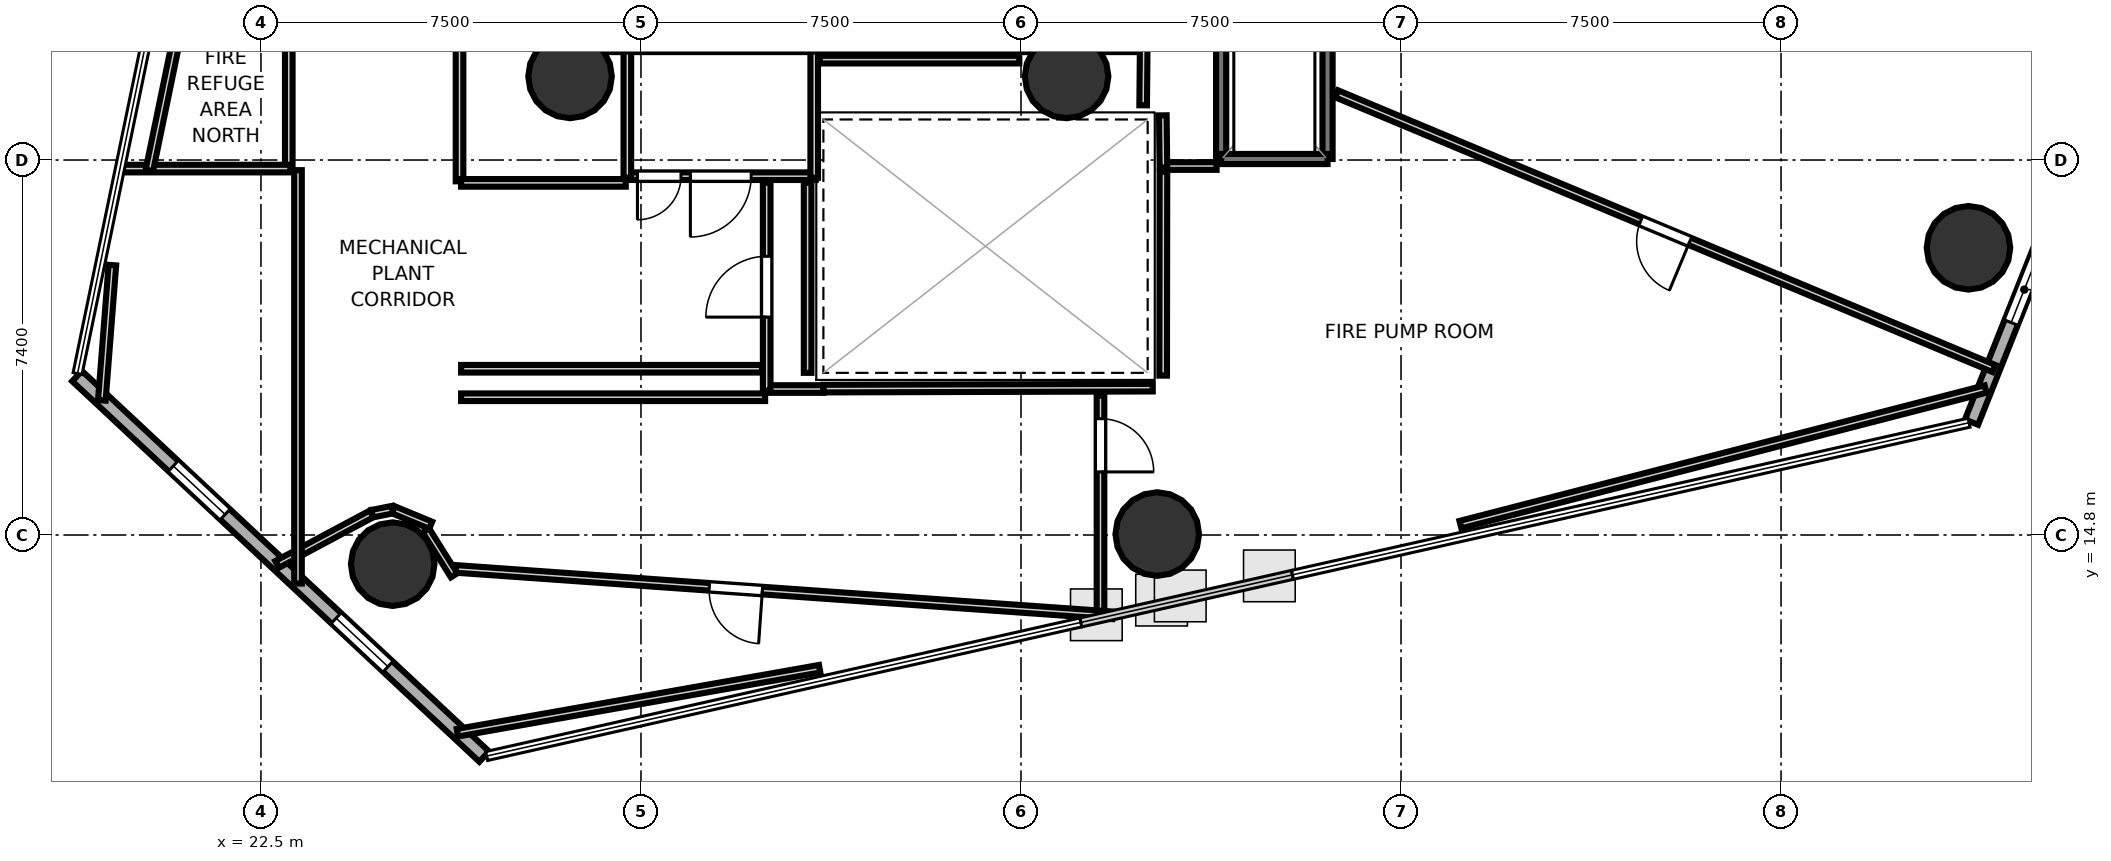
"""IFC4 building model, lengths in metres.
Left out: names, types, materials, properties, quantities, classifications, styles, units other than length and angle.
Written with IfcOpenShell. Run it as: python <this file> out.ifc"""

import sys

from ifc_helpers import new_model, si_unit, direction, frame, frame_2d, origin, origin_2d, place, context, subcontext, project, spatial, rectangle, hollow_circle, extrude, element, fill, save


model = new_model("IFC4")
c1 = context("Model", 3, precision=1e-05, world=origin(), true_north=direction((0.0, 1.0)))
c2 = subcontext(c1, "Body", "Model", "MODEL_VIEW")
j1 = project(units=[si_unit("LENGTHUNIT", "METRE"), si_unit("PLANEANGLEUNIT", "RADIAN")], contexts=[c1])
p1 = place(None, origin())
s1 = spatial("IfcSite", under=j1, at=p1, CompositionType="ELEMENT")
p2 = place(p1, origin())
s2 = spatial("IfcBuilding", under=s1, at=p2, CompositionType="ELEMENT")
p3 = place(p2, frame((0.0, 0.0, 93.2)))
s3 = spatial("IfcBuildingStorey", under=s2, at=p3, CompositionType="ELEMENT", Elevation=93.2)
for number, where, z_axis, x_axis in (
    (1, (28.6, 23.85, 0.0), (0.0, 0.0, 1.0), (1.0, 0.0, 0.0)),
    (2, (38.4, 23.85, 0.0), (0.0, 0.0, 1.0), (1.0, 0.0, 0.0)),
    (3, (56.199, 20.468, 0.0), (0.0, 0.0, 1.0), (1.0, 0.0, 0.0)),
    (4, (25.1, 14.225, 0.0), (0.0, 0.0, 1.0), (1.0, 0.0, 0.0)),
    (5, (40.189, 14.819, 0.0), (0.0, 0.0, 1.0), (1.0, 0.0, 0.0)),
):
    element("IfcColumn", number, at=place(p3, frame(where, z_axis=z_axis, x_axis=x_axis)), inside=s3, PredefinedType="COLUMN", context=c2, shape_type="SweptSolid", body=[
        extrude(hollow_circle(Radius=0.825, WallThickness=0.04, at=origin_2d()), origin(), (0.0, 0.0, 1.0), 4.6),
    ])
p4 = place(p3, frame((56.259, 17.027, 0.0), z_axis=(0.0, 0.0, 1.0), x_axis=(0.369797409366, 0.929112413019, 0.0)))
e6 = element("IfcWall", 6, at=p4, inside=s3, PredefinedType="SOLIDWALL", context=c2, shape_type="SweptSolid", body=[
    extrude(rectangle(XDim=9.382, YDim=0.28, at=frame_2d((4.691, 0.0))), origin(), (0.0, 0.0, 1.0), 4.42),
])
p5 = place(p4, frame((2.115, 0.0, 1.0)))
e7 = element("IfcOpeningElement", 7, at=p5, cuts=e6, PredefinedType="OPENING", context=c2, shape_type="SweptSolid", body=[
    extrude(rectangle(XDim=1.4, YDim=1.5, at=frame_2d((0.7, 0.75))), frame((0.0, 0.15, 0.0), z_axis=(0.0, -1.0, 0.0), x_axis=(1.0, 0.0, 0.0)), (0.0, 0.0, 1.0), 0.3),
])
p6 = place(p4, frame((5.867, 0.0, 1.0)))
e8 = element("IfcOpeningElement", 8, at=p6, cuts=e6, PredefinedType="OPENING", context=c2, shape_type="SweptSolid", body=[
    extrude(rectangle(XDim=1.4, YDim=1.5, at=frame_2d((0.7, 0.75))), frame((0.0, 0.15, 0.0), z_axis=(0.0, -1.0, 0.0), x_axis=(1.0, 0.0, 0.0)), (0.0, 0.0, 1.0), 0.3),
])
p7 = place(p3, frame((18.871, 17.937, 0.0), z_axis=(0.0, 0.0, 1.0), x_axis=(0.730566417868, -0.682841642758, 0.0)))
e9 = element("IfcWall", 9, at=p7, inside=s3, PredefinedType="SOLIDWALL", context=c2, shape_type="SweptSolid", body=[
    extrude(rectangle(XDim=10.999, YDim=0.28, at=frame_2d((5.499, 0.0))), origin(), (0.0, 0.0, 1.0), 4.42),
])
p8 = place(p7, frame((2.6, 0.0, 1.0)))
e10 = element("IfcOpeningElement", 10, at=p8, cuts=e9, PredefinedType="OPENING", context=c2, shape_type="SweptSolid", body=[
    extrude(rectangle(XDim=1.4, YDim=1.5, at=frame_2d((0.7, 0.75))), frame((0.0, 0.15, 0.0), z_axis=(0.0, -1.0, 0.0), x_axis=(1.0, 0.0, 0.0)), (0.0, 0.0, 1.0), 0.3),
])
p9 = place(p7, frame((6.999, 0.0, 1.0)))
e11 = element("IfcOpeningElement", 11, at=p9, cuts=e9, PredefinedType="OPENING", context=c2, shape_type="SweptSolid", body=[
    extrude(rectangle(XDim=1.4, YDim=1.5, at=frame_2d((0.7, 0.75))), frame((0.0, 0.15, 0.0), z_axis=(0.0, -1.0, 0.0), x_axis=(1.0, 0.0, 0.0)), (0.0, 0.0, 1.0), 0.3),
])
for number, where, z_axis, x_axis in (
    (12, (43.55, 22.22, 0.0), (0.0, 0.0, 1.0), (0.0, 1.0, 0.0)),
    (13, (41.45, 22.22, 0.0), (0.0, 0.0, 1.0), (0.0, 1.0, 0.0)),
):
    element("IfcWall", number, at=place(p3, frame(where, z_axis=z_axis, x_axis=x_axis)), inside=s3, PredefinedType="SOLIDWALL", context=c2, shape_type="SweptSolid", body=[
        extrude(rectangle(XDim=2.36, YDim=0.2, at=frame_2d((1.18, 0.0))), origin(), (0.0, 0.0, 1.0), 4.42),
    ])
p10 = place(p3, frame((41.45, 22.22, 0.0), z_axis=(0.0, 0.0, 1.0), x_axis=(1.0, 0.0, 0.0)))
e14 = element("IfcWall", 14, at=p10, inside=s3, PredefinedType="SOLIDWALL", context=c2, shape_type="SweptSolid", body=[
    extrude(rectangle(XDim=2.1, YDim=0.2, at=frame_2d((1.05, 0.0))), origin(), (0.0, 0.0, 1.0), 4.42),
])
p11 = place(p3, frame((33.45, 21.881, 0.0), z_axis=(0.0, 0.0, 1.0), x_axis=(-1.0, 0.0, 0.0)))
e15 = element("IfcWall", 15, at=p11, inside=s3, PredefinedType="PARTITIONING", context=c2, shape_type="SweptSolid", body=[
    extrude(rectangle(XDim=3.75, YDim=0.15, at=frame_2d((1.875, 0.0))), origin(), (0.0, 0.0, 1.0), 2.94),
])
p12 = place(p11, frame((1.275, 0.0, 0.0)))
e16 = element("IfcOpeningElement", 16, at=p12, cuts=e15, PredefinedType="OPENING", context=c2, shape_type="SweptSolid", body=[
    extrude(rectangle(XDim=1.2, YDim=2.15, at=frame_2d((0.6, 1.075))), frame((0.0, 0.085, 0.0), z_axis=(0.0, -1.0, 0.0), x_axis=(1.0, 0.0, 0.0)), (0.0, 0.0, 1.0), 0.17),
])
p13 = place(p11, frame((2.66, 0.0, 0.0)))
e17 = element("IfcOpeningElement", 17, at=p13, cuts=e15, PredefinedType="OPENING", context=c2, shape_type="SweptSolid", body=[
    extrude(rectangle(XDim=0.86, YDim=2.05, at=frame_2d((0.43, 1.025))), frame((0.0, 0.085, 0.0), z_axis=(0.0, -1.0, 0.0), x_axis=(1.0, 0.0, 0.0)), (0.0, 0.0, 1.0), 0.17),
])
for number, where, z_axis, x_axis in (
    (18, (29.731, 21.85, 0.0), (0.0, 0.0, 1.0), (0.0, 1.0, 0.0)),
    (19, (33.419, 24.342, 0.0), (0.0, 0.0, 1.0), (0.0, -1.0, 0.0)),
):
    element("IfcWall", number, at=place(p3, frame(where, z_axis=z_axis, x_axis=x_axis)), inside=s3, PredefinedType="PARTITIONING", context=c2, shape_type="SweptSolid", body=[
        extrude(rectangle(XDim=2.492, YDim=0.15, at=frame_2d((1.246, 0.0))), origin(), (0.0, 0.0, 1.0), 2.94),
    ])
p14 = place(p3, frame((41.36, 22.081, 0.0), z_axis=(0.0, 0.0, 1.0), x_axis=(-1.0, 0.0, 0.0)))
e20 = element("IfcWall", 20, at=p14, inside=s3, PredefinedType="PARTITIONING", context=c2, shape_type="SweptSolid", body=[
    extrude(rectangle(XDim=1.08, YDim=0.15, at=frame_2d((0.54, 0.0))), origin(), (0.0, 0.0, 1.0), 2.94),
])
p15 = place(p3, frame((40.311, 22.05, 0.0), z_axis=(0.0, 0.0, 1.0), x_axis=(-0.011836292006, 0.999929948642, 0.0)))
e21 = element("IfcWall", 21, at=p15, inside=s3, PredefinedType="PARTITIONING", context=c2, shape_type="SweptSolid", body=[
    extrude(rectangle(XDim=1.031, YDim=0.15, at=frame_2d((0.516, 0.0))), origin(), (0.0, 0.0, 1.0), 2.94),
])
p16 = place(p3, frame((39.911, 23.28, 0.0), z_axis=(0.0, 0.0, 1.0), x_axis=(0.009397771291, 0.999955839972, 0.0)))
e22 = element("IfcWall", 22, at=p16, inside=s3, PredefinedType="PARTITIONING", context=c2, shape_type="SweptSolid", body=[
    extrude(rectangle(XDim=1.481, YDim=0.15, at=frame_2d((0.74, 0.0))), origin(), (0.0, 0.0, 1.0), 2.94),
])
p17 = place(p3, frame((37.467, 24.181, 0.0), z_axis=(0.0, 0.0, 1.0), x_axis=(-1.0, 0.0, 0.0)))
e23 = element("IfcWall", 23, at=p17, inside=s3, PredefinedType="PARTITIONING", context=c2, shape_type="SweptSolid", body=[
    extrude(rectangle(XDim=3.937, YDim=0.15, at=frame_2d((1.968, 0.0))), origin(), (0.0, 0.0, 1.0), 2.94),
])
p18 = place(p3, frame((23.049, 29.392, 0.0), z_axis=(0.0, 0.0, 1.0), x_axis=(0.0, -1.0, 0.0)))
e24 = element("IfcWall", 24, at=p18, inside=s3, PredefinedType="PARTITIONING", context=c2, shape_type="SweptSolid", body=[
    extrude(rectangle(XDim=7.392, YDim=0.15, at=frame_2d((3.696, 0.0))), origin(), (0.0, 0.0, 1.0), 2.94),
])
p19 = place(p18, frame((3.096, 0.0, 0.0)))
e25 = element("IfcOpeningElement", 25, at=p19, cuts=e24, PredefinedType="OPENING", context=c2, shape_type="SweptSolid", body=[
    extrude(rectangle(XDim=1.2, YDim=2.15, at=frame_2d((0.6, 1.075))), frame((0.0, 0.085, 0.0), z_axis=(0.0, -1.0, 0.0), x_axis=(1.0, 0.0, 0.0)), (0.0, 0.0, 1.0), 0.17),
])
p20 = place(p3, frame((23.08, 22.031, 0.0), z_axis=(0.0, 0.0, 1.0), x_axis=(-1.0, 0.0, 0.0)))
e26 = element("IfcWall", 26, at=p20, inside=s3, PredefinedType="PARTITIONING", context=c2, shape_type="SweptSolid", body=[
    extrude(rectangle(XDim=3.383, YDim=0.15, at=frame_2d((1.692, 0.0))), origin(), (0.0, 0.0, 1.0), 2.94),
])
p21 = place(p3, frame((20.297, 21.994, 0.0), z_axis=(0.0, 0.0, 1.0), x_axis=(0.202453924761, 0.979291789177, 0.0)))
e27 = element("IfcWall", 27, at=p21, inside=s3, PredefinedType="PARTITIONING", context=c2, shape_type="SweptSolid", body=[
    extrude(rectangle(XDim=8.144, YDim=0.15, at=frame_2d((4.072, 0.0))), origin(), (0.0, 0.0, 1.0), 2.94),
])
p22 = place(p3, frame((33.6, 17.689, 0.0), z_axis=(0.0, 0.0, 1.0), x_axis=(0.999995817826, 0.002892115308, 0.0)))
e28 = element("IfcWall", 28, at=p22, inside=s3, PredefinedType="PARTITIONING", context=c2, shape_type="SweptSolid", body=[
    extrude(rectangle(XDim=6.5, YDim=0.15, at=frame_2d((3.25, 0.0))), origin(), (0.0, 0.0, 1.0), 2.94),
])
p23 = place(p3, frame((33.6, 17.681, 0.0), z_axis=(0.0, 0.0, 1.0), x_axis=(-1.0, 0.0, 0.0)))
e29 = element("IfcWall", 29, at=p23, inside=s3, PredefinedType="PARTITIONING", context=c2, shape_type="SweptSolid", body=[
    extrude(rectangle(XDim=1.15, YDim=0.15, at=frame_2d((0.575, 0.0))), origin(), (0.0, 0.0, 1.0), 2.94),
])
p24 = place(p3, frame((32.481, 17.65, 0.0), z_axis=(0.0, 0.0, 1.0), x_axis=(0.0, 1.0, 0.0)))
e30 = element("IfcWall", 30, at=p24, inside=s3, PredefinedType="PARTITIONING", context=c2, shape_type="SweptSolid", body=[
    extrude(rectangle(XDim=4.1, YDim=0.15, at=frame_2d((2.05, 0.0))), origin(), (0.0, 0.0, 1.0), 2.94),
])
p25 = place(p24, frame((1.45, 0.0, 0.0)))
e31 = element("IfcOpeningElement", 31, at=p25, cuts=e30, PredefinedType="OPENING", context=c2, shape_type="SweptSolid", body=[
    extrude(rectangle(XDim=1.2, YDim=2.15, at=frame_2d((0.6, 1.075))), frame((0.0, 0.085, 0.0), z_axis=(0.0, -1.0, 0.0), x_axis=(1.0, 0.0, 0.0)), (0.0, 0.0, 1.0), 0.17),
])
p26 = place(p3, frame((33.289, 21.75, 0.0), z_axis=(0.0, 0.0, 1.0), x_axis=(0.0, -1.0, 0.0)))
e32 = element("IfcWall", 32, at=p26, inside=s3, PredefinedType="PARTITIONING", context=c2, shape_type="SweptSolid", body=[
    extrude(rectangle(XDim=3.75, YDim=0.15, at=frame_2d((1.875, 0.0))), origin(), (0.0, 0.0, 1.0), 2.94),
])
p27 = place(p3, frame((26.419, 24.548, 0.0), z_axis=(0.0, 0.0, 1.0), x_axis=(0.0, -1.0, 0.0)))
e33 = element("IfcWall", 33, at=p27, inside=s3, PredefinedType="PARTITIONING", context=c2, shape_type="SweptSolid", body=[
    extrude(rectangle(XDim=2.768, YDim=0.15, at=frame_2d((1.384, 0.0))), origin(), (0.0, 0.0, 1.0), 2.94),
])
p28 = place(p3, frame((26.45, 21.749, 0.0), z_axis=(0.0, 0.0, 1.0), x_axis=(1.0, 0.0, 0.0)))
e34 = element("IfcWall", 34, at=p28, inside=s3, PredefinedType="PARTITIONING", context=c2, shape_type="SweptSolid", body=[
    extrude(rectangle(XDim=3.25, YDim=0.15, at=frame_2d((1.625, 0.0))), origin(), (0.0, 0.0, 1.0), 2.94),
])
p29 = place(p3, frame((32.388, 18.081, 0.0), z_axis=(0.0, 0.0, 1.0), x_axis=(-1.0, 0.0, 0.0)))
e35 = element("IfcWall", 35, at=p29, inside=s3, PredefinedType="PARTITIONING", context=c2, shape_type="SweptSolid", body=[
    extrude(rectangle(XDim=5.938, YDim=0.15, at=frame_2d((2.969, 0.0))), origin(), (0.0, 0.0, 1.0), 2.94),
])
p30 = place(p3, frame((26.45, 17.519, 0.0), z_axis=(0.0, 0.0, 1.0), x_axis=(1.0, 0.0, 0.0)))
e36 = element("IfcWall", 36, at=p30, inside=s3, PredefinedType="PARTITIONING", context=c2, shape_type="SweptSolid", body=[
    extrude(rectangle(XDim=6.0, YDim=0.15, at=frame_2d((3.0, 0.0))), origin(), (0.0, 0.0, 1.0), 2.94),
])
p31 = place(p3, frame((39.069, 17.55, 0.0), z_axis=(0.0, 0.0, 1.0), x_axis=(0.0, -1.0, 0.0)))
e37 = element("IfcWall", 37, at=p31, inside=s3, PredefinedType="PARTITIONING", context=c2, shape_type="SweptSolid", body=[
    extrude(rectangle(XDim=4.408, YDim=0.15, at=frame_2d((2.204, 0.0))), origin(), (0.0, 0.0, 1.0), 2.94),
])
p32 = place(p31, frame((0.455, 0.0, 0.0)))
e38 = element("IfcOpeningElement", 38, at=p32, cuts=e37, PredefinedType="OPENING", context=c2, shape_type="SweptSolid", body=[
    extrude(rectangle(XDim=1.05, YDim=2.15, at=frame_2d((0.525, 1.075))), frame((0.0, 0.085, 0.0), z_axis=(0.0, -1.0, 0.0), x_axis=(1.0, 0.0, 0.0)), (0.0, 0.0, 1.0), 0.17),
])
p33 = place(p3, frame((39.306, 13.215, 0.0), z_axis=(0.0, 0.0, 1.0), x_axis=(-0.997511458512, 0.07050453983, 0.0)))
e39 = element("IfcWall", 39, at=p33, inside=s3, PredefinedType="PARTITIONING", context=c2, shape_type="SweptSolid", body=[
    extrude(rectangle(XDim=12.992, YDim=0.15, at=frame_2d((6.496, 0.0))), origin(), (0.0, 0.0, 1.0), 2.94),
])
p34 = place(p33, frame((6.927, 0.0, 0.0)))
e40 = element("IfcOpeningElement", 40, at=p34, cuts=e39, PredefinedType="OPENING", context=c2, shape_type="SweptSolid", body=[
    extrude(rectangle(XDim=1.05, YDim=2.15, at=frame_2d((0.525, 1.075))), frame((0.0, 0.085, 0.0), z_axis=(0.0, -1.0, 0.0), x_axis=(1.0, 0.0, 0.0)), (0.0, 0.0, 1.0), 0.17),
])
p35 = place(p3, frame((25.851, 14.993, 0.0), z_axis=(0.0, 0.0, 1.0), x_axis=(-0.923968482091, 0.382468618454, 0.0)))
e41 = element("IfcWall", 41, at=p35, inside=s3, PredefinedType="PARTITIONING", context=c2, shape_type="SweptSolid", body=[
    extrude(rectangle(XDim=0.8, YDim=0.15, at=frame_2d((0.4, 0.0))), origin(), (0.0, 0.0, 1.0), 2.94),
])
p36 = place(p3, frame((25.094, 15.3, 0.0), z_axis=(0.0, 0.0, 1.0), x_axis=(-0.980878946489, -0.194618838589, 0.0)))
e42 = element("IfcWall", 42, at=p36, inside=s3, PredefinedType="PARTITIONING", context=c2, shape_type="SweptSolid", body=[
    extrude(rectangle(XDim=0.408, YDim=0.15, at=frame_2d((0.204, 0.0))), origin(), (0.0, 0.0, 1.0), 2.94),
])
p37 = place(p3, frame((24.686, 15.218, 0.0), z_axis=(0.0, 0.0, 1.0), x_axis=(-0.881959784986, -0.471324662698, 0.0)))
e43 = element("IfcWall", 43, at=p37, inside=s3, PredefinedType="PARTITIONING", context=c2, shape_type="SweptSolid", body=[
    extrude(rectangle(XDim=2.116, YDim=0.15, at=frame_2d((1.058, 0.0))), origin(), (0.0, 0.0, 1.0), 2.94),
])
p38 = place(p3, frame((23.231, 13.842, 0.0), z_axis=(0.0, 0.0, 1.0), x_axis=(0.0, 1.0, 0.0)))
e44 = element("IfcWall", 44, at=p38, inside=s3, PredefinedType="PARTITIONING", context=c2, shape_type="SweptSolid", body=[
    extrude(rectangle(XDim=8.158, YDim=0.15, at=frame_2d((4.079, 0.0))), origin(), (0.0, 0.0, 1.0), 2.94),
])
p39 = place(p3, frame((25.756, 14.891, 0.0), z_axis=(0.0, 0.0, 1.0), x_axis=(0.531340110622, -0.84715859604, 0.0)))
e45 = element("IfcWall", 45, at=p39, inside=s3, PredefinedType="PARTITIONING", context=c2, shape_type="SweptSolid", body=[
    extrude(rectangle(XDim=1.047, YDim=0.15, at=frame_2d((0.523, 0.0))), origin(), (0.0, 0.0, 1.0), 2.94),
])
p40 = place(p3, frame((33.526, 12.162, 0.0), z_axis=(0.0, 0.0, 1.0), x_axis=(-0.984746635423, -0.173994436761, 0.0)))
e46 = element("IfcWall", 46, at=p40, inside=s3, PredefinedType="PARTITIONING", context=c2, shape_type="SweptSolid", body=[
    extrude(rectangle(XDim=7.26, YDim=0.15, at=frame_2d((3.63, 0.0))), origin(), (0.0, 0.0, 1.0), 2.94),
])
p41 = place(p3, frame((19.359, 17.457, 0.0), z_axis=(0.0, 0.0, 1.0), x_axis=(0.077965556161, 0.99695605322, 0.0)))
e47 = element("IfcWall", 47, at=p41, inside=s3, PredefinedType="PARTITIONING", context=c2, shape_type="SweptSolid", body=[
    extrude(rectangle(XDim=2.677, YDim=0.15, at=frame_2d((1.339, 0.0))), origin(), (0.0, 0.0, 1.0), 2.94),
])
p42 = place(p3, frame((56.702, 18.086, 0.0), z_axis=(0.0, 0.0, 1.0), x_axis=(-0.922688059658, 0.385547331161, 0.0)))
e48 = element("IfcWall", 48, at=p42, inside=s3, PredefinedType="PARTITIONING", context=c2, shape_type="SweptSolid", body=[
    extrude(rectangle(XDim=14.06, YDim=0.15, at=frame_2d((7.03, 0.0))), origin(), (0.0, 0.0, 1.0), 2.94),
])
p43 = place(p42, frame((6.505, 0.0, 0.0)))
e49 = element("IfcOpeningElement", 49, at=p43, cuts=e48, PredefinedType="OPENING", context=c2, shape_type="SweptSolid", body=[
    extrude(rectangle(XDim=1.05, YDim=2.15, at=frame_2d((0.525, 1.075))), frame((0.0, 0.085, 0.0), z_axis=(0.0, -1.0, 0.0), x_axis=(1.0, 0.0, 0.0)), (0.0, 0.0, 1.0), 0.17),
])
p44 = place(p3, frame((40.306, 17.945, 0.0), z_axis=(0.0, 0.0, 1.0), x_axis=(0.001334545369, 0.999999109494, 0.0)))
e50 = element("IfcWall", 50, at=p44, inside=s3, PredefinedType="PARTITIONING", context=c2, shape_type="SweptSolid", body=[
    extrude(rectangle(XDim=4.025, YDim=0.15, at=frame_2d((2.012, 0.0))), origin(), (0.0, 0.0, 1.0), 2.94),
])
p45 = place(p3, frame((56.537, 17.68, 0.0), z_axis=(0.0, 0.0, 1.0), x_axis=(-0.968269668655, -0.249907680481, 0.0)))
e51 = element("IfcWall", 51, at=p45, inside=s3, PredefinedType="PARTITIONING", context=c2, shape_type="SweptSolid", body=[
    extrude(rectangle(XDim=10.704, YDim=0.15, at=frame_2d((5.352, 0.0))), origin(), (0.0, 0.0, 1.0), 2.94),
])
p46 = place(p12, origin())
e52 = element("IfcDoor", 52, at=p46, inside=s3, OperationType="SINGLE_SWING_RIGHT", PredefinedType="DOOR", context=c2, shape_type="SweptSolid", body=[
    extrude(rectangle(XDim=1.2, YDim=2.15, at=frame_2d((0.6, 1.075))), frame((0.0, 0.025, 0.0), z_axis=(0.0, -1.0, 0.0), x_axis=(1.0, 0.0, 0.0)), (0.0, 0.0, 1.0), 0.05),
])
fill(e16, e52)
p47 = place(p25, origin())
e53 = element("IfcDoor", 53, at=p47, inside=s3, OperationType="SINGLE_SWING_LEFT", PredefinedType="DOOR", context=c2, shape_type="SweptSolid", body=[
    extrude(rectangle(XDim=1.2, YDim=2.15, at=frame_2d((0.6, 1.075))), frame((0.0, 0.025, 0.0), z_axis=(0.0, -1.0, 0.0), x_axis=(1.0, 0.0, 0.0)), (0.0, 0.0, 1.0), 0.05),
])
fill(e31, e53)
p48 = place(p13, origin())
e54 = element("IfcDoor", 54, at=p48, inside=s3, OperationType="SINGLE_SWING_RIGHT", PredefinedType="DOOR", context=c2, shape_type="SweptSolid", body=[
    extrude(rectangle(XDim=0.86, YDim=2.05, at=frame_2d((0.43, 1.025))), frame((0.0, 0.025, 0.0), z_axis=(0.0, -1.0, 0.0), x_axis=(1.0, 0.0, 0.0)), (0.0, 0.0, 1.0), 0.05),
])
fill(e17, e54)
p49 = place(p34, origin())
e55 = element("IfcDoor", 55, at=p49, inside=s3, OperationType="SINGLE_SWING_LEFT", PredefinedType="DOOR", context=c2, shape_type="SweptSolid", body=[
    extrude(rectangle(XDim=1.05, YDim=2.15, at=frame_2d((0.525, 1.075))), frame((0.0, 0.025, 0.0), z_axis=(0.0, -1.0, 0.0), x_axis=(1.0, 0.0, 0.0)), (0.0, 0.0, 1.0), 0.05),
])
fill(e40, e55)
p50 = place(p32, origin())
e56 = element("IfcDoor", 56, at=p50, inside=s3, OperationType="SINGLE_SWING_RIGHT", PredefinedType="DOOR", context=c2, shape_type="SweptSolid", body=[
    extrude(rectangle(XDim=1.05, YDim=2.15, at=frame_2d((0.525, 1.075))), frame((0.0, 0.025, 0.0), z_axis=(0.0, -1.0, 0.0), x_axis=(1.0, 0.0, 0.0)), (0.0, 0.0, 1.0), 0.05),
])
fill(e38, e56)
p51 = place(p43, origin())
e57 = element("IfcDoor", 57, at=p51, inside=s3, OperationType="SINGLE_SWING_LEFT", PredefinedType="DOOR", context=c2, shape_type="SweptSolid", body=[
    extrude(rectangle(XDim=1.05, YDim=2.15, at=frame_2d((0.525, 1.075))), frame((0.0, 0.025, 0.0), z_axis=(0.0, -1.0, 0.0), x_axis=(1.0, 0.0, 0.0)), (0.0, 0.0, 1.0), 0.05),
])
fill(e49, e57)
p52 = place(p5, origin())
e58 = element("IfcWindow", 58, at=p52, inside=s3, PartitioningType="SINGLE_PANEL", PredefinedType="WINDOW", context=c2, shape_type="SweptSolid", body=[
    extrude(rectangle(XDim=1.4, YDim=1.5, at=frame_2d((0.7, 0.75))), frame((0.0, 0.03, 0.0), z_axis=(0.0, -1.0, 0.0), x_axis=(1.0, 0.0, 0.0)), (0.0, 0.0, 1.0), 0.06),
])
fill(e7, e58)
p53 = place(p8, origin())
e59 = element("IfcWindow", 59, at=p53, inside=s3, PartitioningType="SINGLE_PANEL", PredefinedType="WINDOW", context=c2, shape_type="SweptSolid", body=[
    extrude(rectangle(XDim=1.4, YDim=1.5, at=frame_2d((0.7, 0.75))), frame((0.0, 0.03, 0.0), z_axis=(0.0, -1.0, 0.0), x_axis=(1.0, 0.0, 0.0)), (0.0, 0.0, 1.0), 0.06),
])
fill(e10, e59)
p54 = place(p9, origin())
e60 = element("IfcWindow", 60, at=p54, inside=s3, PartitioningType="SINGLE_PANEL", PredefinedType="WINDOW", context=c2, shape_type="SweptSolid", body=[
    extrude(rectangle(XDim=1.4, YDim=1.5, at=frame_2d((0.7, 0.75))), frame((0.0, 0.03, 0.0), z_axis=(0.0, -1.0, 0.0), x_axis=(1.0, 0.0, 0.0)), (0.0, 0.0, 1.0), 0.06),
])
fill(e11, e60)
save(model, sys.argv[1])
